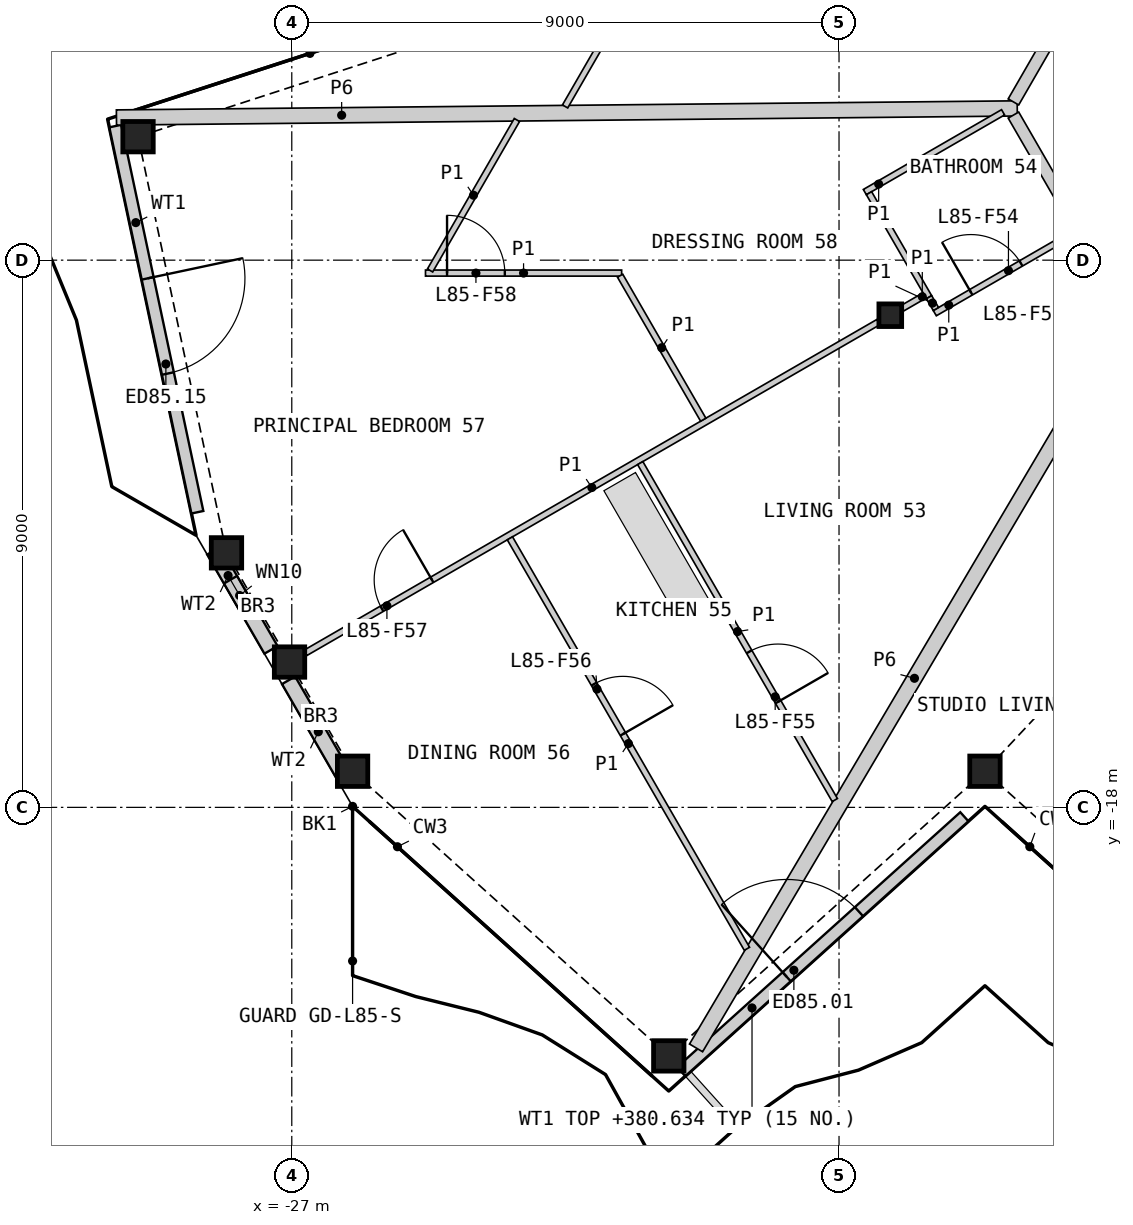
"""IFC4 building model, lengths in metres.
Left out: names, types, materials, properties, quantities, classifications, styles, units other than length and angle.
Written with IfcOpenShell. Run it as: python <this file> out.ifc"""

import sys

from ifc_helpers import new_model, si_unit, direction, frame, frame_2d, origin, origin_2d, place, context, subcontext, project, spatial, rectangle, hollow_rectangle, i_section, extrude, element, fill, save


model = new_model("IFC4")
c1 = context("Model", 3, precision=1e-05, world=origin(), true_north=direction((0.0, 1.0)))
c2 = subcontext(c1, "Body", "Model", "MODEL_VIEW")
j1 = project(units=[si_unit("LENGTHUNIT", "METRE"), si_unit("PLANEANGLEUNIT", "RADIAN")], contexts=[c1])
p1 = place(None, origin())
s1 = spatial("IfcSite", under=j1, at=p1, CompositionType="ELEMENT")
p2 = place(p1, origin())
s2 = spatial("IfcBuilding", under=s1, at=p2, CompositionType="ELEMENT")
p3 = place(p2, frame((0.0, 0.0, 378.0)))
s3 = spatial("IfcBuildingStorey", under=s2, at=p3, CompositionType="ELEMENT", Elevation=378.0)
for number, where, z_axis, x_axis in (
    (1, (-26.0, -17.406, 0.0), (0.0, 0.0, 1.0), (1.0, 0.0, 0.0)),
    (2, (-20.8, -22.088, 0.0), (0.0, 0.0, 1.0), (1.0, 0.0, 0.0)),
    (3, (-15.6, -17.406, 0.0), (0.0, 0.0, 1.0), (1.0, 0.0, 0.0)),
    (4, (-29.529, -6.969, 0.0), (0.0, 0.0, 1.0), (1.0, 0.0, 0.0)),
    (5, (-28.074, -13.814, 0.0), (0.0, 0.0, 1.0), (1.0, 0.0, 0.0)),
    (6, (-27.037, -15.61, 0.0), (0.0, 0.0, 1.0), (1.0, 0.0, 0.0)),
):
    element("IfcColumn", number, at=place(p3, frame(where, z_axis=z_axis, x_axis=x_axis)), inside=s3, PredefinedType="COLUMN", context=c2, shape_type="SweptSolid", body=[
        extrude(hollow_rectangle(XDim=0.5, YDim=0.5, WallThickness=0.03, at=origin_2d()), origin(), (0.0, 0.0, 1.0), 3.4),
    ])
p4 = place(p3, frame((-17.157, -9.906, 0.0), z_axis=(0.0, 0.0, 1.0), x_axis=(1.0, 0.0, 0.0)))
e7 = element("IfcColumn", 7, at=p4, inside=s3, PredefinedType="COLUMN", context=c2, shape_type="SweptSolid", body=[
    extrude(i_section(OverallWidth=0.374, OverallDepth=0.372, WebThickness=0.016, FlangeThickness=0.026, at=origin_2d()), origin(), (0.0, 0.0, 1.0), 3.4),
])
p5 = place(p3, frame((-20.595, -22.346, 0.0), z_axis=(0.0, 0.0, 1.0), x_axis=(0.743137181878, 0.669139095339, 0.0)))
e8 = element("IfcWall", 8, at=p5, inside=s3, PredefinedType="SOLIDWALL", context=c2, shape_type="SweptSolid", body=[
    extrude(rectangle(XDim=6.265, YDim=0.2, at=frame_2d((3.133, 0.0))), origin(), (0.0, 0.0, 1.0), 2.634),
])
p6 = place(p5, frame((2.333, 0.0, 0.0)))
e9 = element("IfcOpeningElement", 9, at=p6, cuts=e8, PredefinedType="OPENING", context=c2, shape_type="SweptSolid", body=[
    extrude(rectangle(XDim=1.6, YDim=2.25, at=frame_2d((0.8, 1.125))), frame((0.0, 0.11, 0.0), z_axis=(0.0, -1.0, 0.0), x_axis=(1.0, 0.0, 0.0)), (0.0, 0.0, 1.0), 0.22),
])
p7 = place(p3, frame((-29.903, -6.795, 0.0), z_axis=(0.0, 0.0, 1.0), x_axis=(0.207923959653, -0.978144992832, 0.0)))
e10 = element("IfcWall", 10, at=p7, inside=s3, PredefinedType="SOLIDWALL", context=c2, shape_type="SweptSolid", body=[
    extrude(rectangle(XDim=6.493, YDim=0.2, at=frame_2d((3.247, 0.0))), origin(), (0.0, 0.0, 1.0), 2.634),
])
p8 = place(p7, frame((2.561, 0.0, 0.0)))
e11 = element("IfcOpeningElement", 11, at=p8, cuts=e10, PredefinedType="OPENING", context=c2, shape_type="SweptSolid", body=[
    extrude(rectangle(XDim=1.6, YDim=2.25, at=frame_2d((0.8, 1.125))), frame((0.0, 0.11, 0.0), z_axis=(0.0, -1.0, 0.0), x_axis=(1.0, 0.0, 0.0)), (0.0, 0.0, 1.0), 0.22),
])
p9 = place(p3, frame((-28.283, -13.779, 0.0), z_axis=(0.0, 0.0, 1.0), x_axis=(0.500044242988, -0.865999858577, 0.0)))
e12 = element("IfcWall", 12, at=p9, inside=s3, PredefinedType="SOLIDWALL", context=c2, shape_type="SweptSolid", body=[
    extrude(rectangle(XDim=1.883, YDim=0.25, at=frame_2d((0.941, 0.0))), origin(), (0.0, 0.0, 1.0), 2.634),
])
p10 = place(p9, frame((0.55, 0.0, 0.4)))
e13 = element("IfcOpeningElement", 13, at=p10, cuts=e12, PredefinedType="OPENING", context=c2, shape_type="SweptSolid", body=[
    extrude(rectangle(XDim=0.6, YDim=0.6, at=frame_2d((0.3, 0.3))), frame((0.0, 0.135, 0.0), z_axis=(0.0, -1.0, 0.0), x_axis=(1.0, 0.0, 0.0)), (0.0, 0.0, 1.0), 0.27),
])
p11 = place(p3, frame((-27.053, -15.91, 0.0), z_axis=(0.0, 0.0, 1.0), x_axis=(0.500017700655, -0.866015184065, 0.0)))
e14 = element("IfcWall", 14, at=p11, inside=s3, PredefinedType="SOLIDWALL", context=c2, shape_type="SweptSolid", body=[
    extrude(rectangle(XDim=1.957, YDim=0.25, at=frame_2d((0.978, 0.0))), origin(), (0.0, 0.0, 1.0), 2.634),
])
p12 = place(p3, frame((-29.883, -6.654, 0.0), z_axis=(0.0, 0.0, 1.0), x_axis=(0.999949143254, 0.010085182526, 0.0)))
e15 = element("IfcWall", 15, at=p12, inside=s3, PredefinedType="PARTITIONING", context=c2, shape_type="SweptSolid", body=[
    extrude(rectangle(XDim=14.815, YDim=0.25, at=frame_2d((7.408, 0.0))), origin(), (0.0, 0.0, 1.0), 2.33),
])
p13 = place(p3, frame((-20.351, -21.956, 0.0), z_axis=(0.0, 0.0, 1.0), x_axis=(0.508713003719, 0.860936164793, 0.0)))
e16 = element("IfcWall", 16, at=p13, inside=s3, PredefinedType="PARTITIONING", context=c2, shape_type="SweptSolid", body=[
    extrude(rectangle(XDim=14.122, YDim=0.25, at=frame_2d((7.061, 0.0))), origin(), (0.0, 0.0, 1.0), 2.33),
])
p14 = place(p3, frame((-15.131, -6.397, 0.0), z_axis=(0.0, 0.0, 1.0), x_axis=(0.499986217557, 0.866033360935, 0.0)))
e17 = element("IfcWall", 17, at=p14, inside=s3, PredefinedType="PARTITIONING", context=c2, shape_type="SweptSolid", body=[
    extrude(rectangle(XDim=4.3, YDim=0.2, at=frame_2d((2.15, 0.0))), origin(), (0.0, 0.0, 1.0), 3.1),
])
p15 = place(p3, frame((-15.131, -6.614, 0.0), z_axis=(0.0, 0.0, 1.0), x_axis=(0.499967746641, -0.866044024469, 0.0)))
e18 = element("IfcWall", 18, at=p15, inside=s3, PredefinedType="PARTITIONING", context=c2, shape_type="SweptSolid", body=[
    extrude(rectangle(XDim=3.676, YDim=0.2, at=frame_2d((1.838, 0.0))), origin(), (0.0, 0.0, 1.0), 3.1),
])
p16 = place(p15, frame((2.426, 0.0, 0.0)))
e19 = element("IfcOpeningElement", 19, at=p16, cuts=e18, PredefinedType="OPENING", context=c2, shape_type="SweptSolid", body=[
    extrude(rectangle(XDim=1.0, YDim=2.1, at=frame_2d((0.5, 1.05))), frame((0.0, 0.11, 0.0), z_axis=(0.0, -1.0, 0.0), x_axis=(1.0, 0.0, 0.0)), (0.0, 0.0, 1.0), 0.22),
])
p17 = place(p3, frame((-26.777, -15.46, 0.0), z_axis=(0.0, 0.0, 1.0), x_axis=(0.866019680922, 0.500009912158, 0.0)))
e20 = element("IfcWall", 20, at=p17, inside=s3, PredefinedType="PARTITIONING", context=c2, shape_type="SweptSolid", body=[
    extrude(rectangle(XDim=10.881, YDim=0.1, at=frame_2d((5.44, 0.0))), origin(), (0.0, 0.0, 1.0), 2.33),
])
p18 = place(p17, frame((1.454, 0.0, 0.0)))
e21 = element("IfcOpeningElement", 21, at=p18, cuts=e20, PredefinedType="OPENING", context=c2, shape_type="SweptSolid", body=[
    extrude(rectangle(XDim=0.95, YDim=2.1, at=frame_2d((0.475, 1.05))), frame((0.0, 0.06, 0.0), z_axis=(0.0, -1.0, 0.0), x_axis=(1.0, 0.0, 0.0)), (0.0, 0.0, 1.0), 0.12),
])
p19 = place(p3, frame((-23.413, -13.575, 0.0), z_axis=(0.0, 0.0, 1.0), x_axis=(0.499998958472, -0.86602600511, 0.0)))
e22 = element("IfcWall", 22, at=p19, inside=s3, PredefinedType="PARTITIONING", context=c2, shape_type="SweptSolid", body=[
    extrude(rectangle(XDim=7.796, YDim=0.1, at=frame_2d((3.898, 0.0))), origin(), (0.0, 0.0, 1.0), 2.33),
])
p20 = place(p19, frame((2.768, 0.0, 0.0)))
e23 = element("IfcOpeningElement", 23, at=p20, cuts=e22, PredefinedType="OPENING", context=c2, shape_type="SweptSolid", body=[
    extrude(rectangle(XDim=0.95, YDim=2.1, at=frame_2d((0.475, 1.05))), frame((0.0, 0.06, 0.0), z_axis=(0.0, -1.0, 0.0), x_axis=(1.0, 0.0, 0.0)), (0.0, 0.0, 1.0), 0.12),
])
p21 = place(p3, frame((-22.505, -6.472, 0.0), z_axis=(0.0, 0.0, 1.0), x_axis=(0.499999516514, 0.866025682925, 0.0)))
e24 = element("IfcWall", 24, at=p21, inside=s3, PredefinedType="PARTITIONING", context=c2, shape_type="SweptSolid", body=[
    extrude(rectangle(XDim=6.407, YDim=0.1, at=frame_2d((3.204, 0.0))), origin(), (0.0, 0.0, 1.0), 2.33),
])
p22 = place(p21, frame((2.981, 0.0, 0.0)))
e25 = element("IfcOpeningElement", 25, at=p22, cuts=e24, PredefinedType="OPENING", context=c2, shape_type="SweptSolid", body=[
    extrude(rectangle(XDim=0.95, YDim=2.1, at=frame_2d((0.475, 1.05))), frame((0.0, 0.06, 0.0), z_axis=(0.0, -1.0, 0.0), x_axis=(1.0, 0.0, 0.0)), (0.0, 0.0, 1.0), 0.12),
])
p23 = place(p3, frame((-21.269, -12.337, 0.0), z_axis=(0.0, 0.0, 1.0), x_axis=(0.499983315828, -0.866035036182, 0.0)))
e26 = element("IfcWall", 26, at=p23, inside=s3, PredefinedType="PARTITIONING", context=c2, shape_type="SweptSolid", body=[
    extrude(rectangle(XDim=6.4, YDim=0.1, at=frame_2d((3.2, 0.0))), origin(), (0.0, 0.0, 1.0), 2.33),
])
p24 = place(p23, frame((3.584, 0.0, 0.0)))
e27 = element("IfcOpeningElement", 27, at=p24, cuts=e26, PredefinedType="OPENING", context=c2, shape_type="SweptSolid", body=[
    extrude(rectangle(XDim=0.95, YDim=2.1, at=frame_2d((0.475, 1.05))), frame((0.0, 0.06, 0.0), z_axis=(0.0, -1.0, 0.0), x_axis=(1.0, 0.0, 0.0)), (0.0, 0.0, 1.0), 0.12),
])
p25 = place(p3, frame((-24.801, -9.212, 0.0), z_axis=(0.0, 0.0, 1.0), x_axis=(1.0, 0.0, 0.0)))
e28 = element("IfcWall", 28, at=p25, inside=s3, PredefinedType="PARTITIONING", context=c2, shape_type="SweptSolid", body=[
    extrude(rectangle(XDim=3.226, YDim=0.1, at=frame_2d((1.613, 0.0))), origin(), (0.0, 0.0, 1.0), 2.33),
])
p26 = place(p25, frame((0.354, 0.0, 0.0)))
e29 = element("IfcOpeningElement", 29, at=p26, cuts=e28, PredefinedType="OPENING", context=c2, shape_type="SweptSolid", body=[
    extrude(rectangle(XDim=0.95, YDim=2.1, at=frame_2d((0.475, 1.05))), frame((0.0, 0.06, 0.0), z_axis=(0.0, -1.0, 0.0), x_axis=(1.0, 0.0, 0.0)), (0.0, 0.0, 1.0), 0.12),
])
p27 = place(p3, frame((-24.726, -9.169, 0.0), z_axis=(0.0, 0.0, 1.0), x_axis=(0.499971481985, 0.866041868042, 0.0)))
e30 = element("IfcWall", 30, at=p27, inside=s3, PredefinedType="PARTITIONING", context=c2, shape_type="SweptSolid", body=[
    extrude(rectangle(XDim=2.857, YDim=0.1, at=frame_2d((1.429, 0.0))), origin(), (0.0, 0.0, 1.0), 2.33),
])
p28 = place(p3, frame((-21.6, -9.256, 0.0), z_axis=(0.0, 0.0, 1.0), x_axis=(0.500018733116, -0.866014587945, 0.0)))
e31 = element("IfcWall", 31, at=p28, inside=s3, PredefinedType="PARTITIONING", context=c2, shape_type="SweptSolid", body=[
    extrude(rectangle(XDim=2.734, YDim=0.1, at=frame_2d((1.367, 0.0))), origin(), (0.0, 0.0, 1.0), 2.33),
])
p29 = place(p3, frame((-17.575, -7.881, 0.0), z_axis=(0.0, 0.0, 1.0), x_axis=(0.866036909293, 0.499980071345, 0.0)))
e32 = element("IfcWall", 32, at=p29, inside=s3, PredefinedType="PARTITIONING", context=c2, shape_type="SweptSolid", body=[
    extrude(rectangle(XDim=2.625, YDim=0.1, at=frame_2d((1.312, 0.0))), origin(), (0.0, 0.0, 1.0), 2.33),
])
p30 = place(p3, frame((-16.425, -9.872, 0.0), z_axis=(0.0, 0.0, 1.0), x_axis=(0.86603978909, 0.499975083092, 0.0)))
e33 = element("IfcWall", 33, at=p30, inside=s3, PredefinedType="PARTITIONING", context=c2, shape_type="SweptSolid", body=[
    extrude(rectangle(XDim=2.649, YDim=0.1, at=frame_2d((1.325, 0.0))), origin(), (0.0, 0.0, 1.0), 2.33),
])
p31 = place(p30, frame((0.686, 0.0, 0.0)))
e34 = element("IfcOpeningElement", 34, at=p31, cuts=e33, PredefinedType="OPENING", context=c2, shape_type="SweptSolid", body=[
    extrude(rectangle(XDim=0.95, YDim=2.1, at=frame_2d((0.475, 1.05))), frame((0.0, 0.06, 0.0), z_axis=(0.0, -1.0, 0.0), x_axis=(1.0, 0.0, 0.0)), (0.0, 0.0, 1.0), 0.12),
])
p32 = place(p3, frame((-17.507, -7.899, 0.0), z_axis=(0.0, 0.0, 1.0), x_axis=(0.500011643316, -0.866018681408, 0.0)))
e35 = element("IfcWall", 35, at=p32, inside=s3, PredefinedType="PARTITIONING", context=c2, shape_type="SweptSolid", body=[
    extrude(rectangle(XDim=1.973, YDim=0.1, at=frame_2d((0.987, 0.0))), origin(), (0.0, 0.0, 1.0), 2.33),
])
p33 = place(p3, frame((-16.96, -9.792, 0.0), z_axis=(0.0, 0.0, 1.0), x_axis=(0.866137484628, 0.499805820016, 0.0)))
e36 = element("IfcWall", 36, at=p33, inside=s3, PredefinedType="PARTITIONING", context=c2, shape_type="SweptSolid", body=[
    extrude(rectangle(XDim=0.423, YDim=0.1, at=frame_2d((0.211, 0.0))), origin(), (0.0, 0.0, 1.0), 2.33),
])
p34 = place(p3, frame((-16.519, -9.61, 0.0), z_axis=(0.0, 0.0, 1.0), x_axis=(0.50245032488, -0.864606078528, 0.0)))
e37 = element("IfcWall", 37, at=p34, inside=s3, PredefinedType="PARTITIONING", context=c2, shape_type="SweptSolid", body=[
    extrude(rectangle(XDim=0.224, YDim=0.1, at=frame_2d((0.112, 0.0))), origin(), (0.0, 0.0, 1.0), 2.33),
])
p35 = place(p6, origin())
e38 = element("IfcDoor", 38, at=p35, inside=s3, OperationType="DOUBLE_DOOR_SINGLE_SWING", PredefinedType="DOOR", context=c2, shape_type="SweptSolid", body=[
    extrude(rectangle(XDim=1.6, YDim=2.25, at=frame_2d((0.8, 1.125))), frame((0.0, 0.025, 0.0), z_axis=(0.0, -1.0, 0.0), x_axis=(1.0, 0.0, 0.0)), (0.0, 0.0, 1.0), 0.05),
])
fill(e9, e38)
p36 = place(p8, origin())
e39 = element("IfcDoor", 39, at=p36, inside=s3, OperationType="DOUBLE_DOOR_SINGLE_SWING", PredefinedType="DOOR", context=c2, shape_type="SweptSolid", body=[
    extrude(rectangle(XDim=1.6, YDim=2.25, at=frame_2d((0.8, 1.125))), frame((0.0, 0.025, 0.0), z_axis=(0.0, -1.0, 0.0), x_axis=(1.0, 0.0, 0.0)), (0.0, 0.0, 1.0), 0.05),
])
fill(e11, e39)
p37 = place(p10, origin())
e40 = element("IfcWindow", 40, at=p37, inside=s3, PartitioningType="SINGLE_PANEL", PredefinedType="WINDOW", context=c2, shape_type="SweptSolid", body=[
    extrude(rectangle(XDim=0.6, YDim=0.6, at=frame_2d((0.3, 0.3))), frame((0.0, 0.03, 0.0), z_axis=(0.0, -1.0, 0.0), x_axis=(1.0, 0.0, 0.0)), (0.0, 0.0, 1.0), 0.06),
])
fill(e13, e40)
p38 = place(p31, origin())
e41 = element("IfcDoor", 41, at=p38, inside=s3, OperationType="SINGLE_SWING_LEFT", PredefinedType="DOOR", context=c2, shape_type="SweptSolid", body=[
    extrude(rectangle(XDim=0.95, YDim=2.1, at=frame_2d((0.475, 1.05))), frame((0.0, 0.025, 0.0), z_axis=(0.0, -1.0, 0.0), x_axis=(1.0, 0.0, 0.0)), (0.0, 0.0, 1.0), 0.05),
])
fill(e34, e41)
p39 = place(p24, origin())
e42 = element("IfcDoor", 42, at=p39, inside=s3, OperationType="SINGLE_SWING_RIGHT", PredefinedType="DOOR", context=c2, shape_type="SweptSolid", body=[
    extrude(rectangle(XDim=0.95, YDim=2.1, at=frame_2d((0.475, 1.05))), frame((0.0, 0.025, 0.0), z_axis=(0.0, -1.0, 0.0), x_axis=(1.0, 0.0, 0.0)), (0.0, 0.0, 1.0), 0.05),
])
fill(e27, e42)
p40 = place(p20, origin())
e43 = element("IfcDoor", 43, at=p40, inside=s3, OperationType="SINGLE_SWING_RIGHT", PredefinedType="DOOR", context=c2, shape_type="SweptSolid", body=[
    extrude(rectangle(XDim=0.95, YDim=2.1, at=frame_2d((0.475, 1.05))), frame((0.0, 0.025, 0.0), z_axis=(0.0, -1.0, 0.0), x_axis=(1.0, 0.0, 0.0)), (0.0, 0.0, 1.0), 0.05),
])
fill(e23, e43)
p41 = place(p18, origin())
e44 = element("IfcDoor", 44, at=p41, inside=s3, OperationType="SINGLE_SWING_RIGHT", PredefinedType="DOOR", context=c2, shape_type="SweptSolid", body=[
    extrude(rectangle(XDim=0.95, YDim=2.1, at=frame_2d((0.475, 1.05))), frame((0.0, 0.025, 0.0), z_axis=(0.0, -1.0, 0.0), x_axis=(1.0, 0.0, 0.0)), (0.0, 0.0, 1.0), 0.05),
])
fill(e21, e44)
p42 = place(p26, origin())
e45 = element("IfcDoor", 45, at=p42, inside=s3, OperationType="SINGLE_SWING_LEFT", PredefinedType="DOOR", context=c2, shape_type="SweptSolid", body=[
    extrude(rectangle(XDim=0.95, YDim=2.1, at=frame_2d((0.475, 1.05))), frame((0.0, 0.025, 0.0), z_axis=(0.0, -1.0, 0.0), x_axis=(1.0, 0.0, 0.0)), (0.0, 0.0, 1.0), 0.05),
])
fill(e29, e45)
save(model, sys.argv[1])
